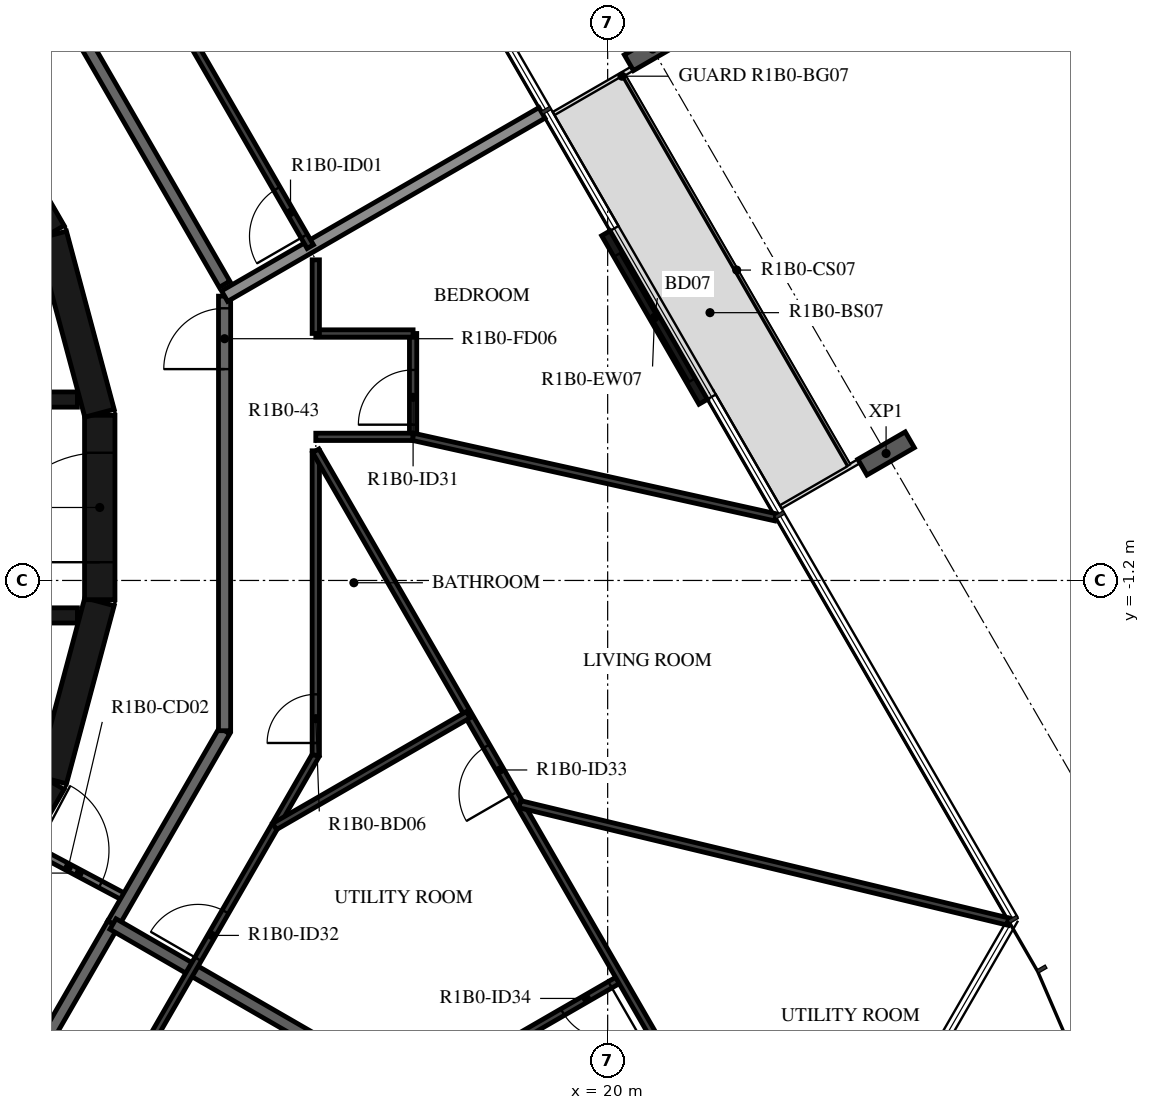
"""IFC4 building model, lengths in metres.
Left out: names, types, materials, properties, quantities, classifications, styles, units other than length and angle.
Written with IfcOpenShell. Run it as: python <this file> out.ifc"""

import sys

from ifc_helpers import new_model, si_unit, direction, frame, frame_2d, origin, origin_2d, place, context, subcontext, project, spatial, rectangle, i_section, extrude, element, fill, save


model = new_model("IFC4")
c1 = context("Model", 3, precision=1e-05, world=origin(), true_north=direction((0.0, 1.0)))
c2 = subcontext(c1, "Body", "Model", "MODEL_VIEW")
j1 = project(units=[si_unit("LENGTHUNIT", "METRE"), si_unit("PLANEANGLEUNIT", "RADIAN")], contexts=[c1])
p1 = place(None, origin())
s1 = spatial("IfcSite", under=j1, at=p1, CompositionType="ELEMENT")
p2 = place(p1, origin())
s2 = spatial("IfcBuilding", under=s1, at=p2, CompositionType="ELEMENT")
p3 = place(p2, frame((0.0, 0.0, 52.4)))
s3 = spatial("IfcBuildingStorey", under=s2, at=p3, CompositionType="ELEMENT", Elevation=52.4)
for number, where, z_axis, x_axis in (
    (1, (24.579, 0.888, -0.38), (0.0, 0.0, 1.0), (0.5, -0.866, 0.0)),
    (2, (20.739, 7.539, -0.38), (0.0, 0.0, 1.0), (0.5, -0.866, 0.0)),
):
    element("IfcColumn", number, at=place(p3, frame(where, z_axis=z_axis, x_axis=x_axis)), inside=s3, PredefinedType="COLUMN", context=c2, shape_type="SweptSolid", body=[
        extrude(i_section(OverallWidth=0.3, OverallDepth=0.9, WebThickness=0.019, FlangeThickness=0.035, FilletRadius=0.03, at=origin_2d()), origin(), (0.0, 0.0, 1.0), 3.5),
    ])
p4 = place(p3, frame((21.571, 1.738, 0.0), z_axis=(0.0, 0.0, 1.0), x_axis=(-0.500028443584, 0.866008981251, 0.0)))
e3 = element("IfcWall", 3, at=p4, inside=s3, PredefinedType="STANDARD", context=c2, shape_type="SweptSolid", body=[
    extrude(rectangle(XDim=3.2, YDim=0.16, at=frame_2d((1.6, 0.0))), origin(), (0.0, 0.0, 1.0), 3.12),
])
p5 = place(p4, frame((0.4, 0.0, 0.0)))
e4 = element("IfcOpeningElement", 4, at=p5, cuts=e3, PredefinedType="OPENING", context=c2, shape_type="SweptSolid", body=[
    extrude(rectangle(XDim=2.4, YDim=2.4, at=frame_2d((1.2, 1.2))), frame((0.0, 0.09, 0.0), z_axis=(0.0, -1.0, 0.0), x_axis=(1.0, 0.0, 0.0)), (0.0, 0.0, 1.0), 0.18),
])
for number, where, z_axis, x_axis in (
    (5, (9.329, -7.137, 0.0), (0.0, 0.0, 1.0), (0.5, 0.866, 0.0)),
    (6, (10.858, -4.479, 0.0), (0.0, 0.0, 1.0), (0.259, 0.966, 0.0)),
):
    element("IfcWall", number, at=place(p3, frame(where, z_axis=z_axis, x_axis=x_axis)), inside=s3, PredefinedType="SHEAR", context=c2, shape_type="SweptSolid", body=[
        extrude(rectangle(XDim=3.033, YDim=0.5, at=frame_2d((1.516, 0.0))), origin(), (0.0, 0.0, 1.0), 3.12),
    ])
p6 = place(p3, frame((11.647, -1.516, 0.0), z_axis=(0.0, 0.0, 1.0), x_axis=(0.0, 1.0, 0.0)))
e7 = element("IfcWall", 7, at=p6, inside=s3, PredefinedType="SHEAR", context=c2, shape_type="SweptSolid", body=[
    extrude(rectangle(XDim=3.033, YDim=0.5, at=frame_2d((1.516, 0.0))), origin(), (0.0, 0.0, 1.0), 3.12),
])
p7 = place(p6, frame((0.616, 0.0, 0.0)))
e8 = element("IfcOpeningElement", 8, at=p7, cuts=e7, PredefinedType="OPENING", context=c2, shape_type="SweptSolid", body=[
    extrude(rectangle(XDim=1.8, YDim=2.1, at=frame_2d((0.9, 1.05))), frame((0.0, 0.26, 0.0), z_axis=(0.0, -1.0, 0.0), x_axis=(1.0, 0.0, 0.0)), (0.0, 0.0, 1.0), 0.52),
])
for number, where, z_axis, x_axis in (
    (9, (11.643, 1.55, 0.0), (0.0, 0.0, 1.0), (-0.259, 0.966, 0.0)),
    (10, (10.845, 4.51, 0.0), (0.0, 0.0, 1.0), (-0.5, 0.866, 0.0)),
):
    element("IfcWall", number, at=place(p3, frame(where, z_axis=z_axis, x_axis=x_axis)), inside=s3, PredefinedType="SHEAR", context=c2, shape_type="SweptSolid", body=[
        extrude(rectangle(XDim=3.033, YDim=0.5, at=frame_2d((1.516, 0.0))), origin(), (0.0, 0.0, 1.0), 3.12),
    ])
p8 = place(p3, frame((3.35, 1.775, 0.0), z_axis=(0.0, 0.0, 1.0), x_axis=(1.0, 0.0, 0.0)))
e11 = element("IfcWall", 11, at=p8, inside=s3, PredefinedType="SHEAR", context=c2, shape_type="SweptSolid", body=[
    extrude(rectangle(XDim=7.93, YDim=0.25, at=frame_2d((3.965, 0.0))), origin(), (0.0, 0.0, 1.0), 3.12),
])
p9 = place(p8, frame((0.35, 0.0, 0.0)))
e12 = element("IfcOpeningElement", 12, at=p9, cuts=e11, PredefinedType="OPENING", context=c2, shape_type="SweptSolid", body=[
    extrude(rectangle(XDim=1.2, YDim=2.4, at=frame_2d((0.6, 1.2))), frame((0.0, 0.135, 0.0), z_axis=(0.0, -1.0, 0.0), x_axis=(1.0, 0.0, 0.0)), (0.0, 0.0, 1.0), 0.27),
])
p10 = place(p8, frame((2.5, 0.0, 0.0)))
e13 = element("IfcOpeningElement", 13, at=p10, cuts=e11, PredefinedType="OPENING", context=c2, shape_type="SweptSolid", body=[
    extrude(rectangle(XDim=1.2, YDim=2.4, at=frame_2d((0.6, 1.2))), frame((0.0, 0.135, 0.0), z_axis=(0.0, -1.0, 0.0), x_axis=(1.0, 0.0, 0.0)), (0.0, 0.0, 1.0), 0.27),
])
p11 = place(p8, frame((4.8, 0.0, 0.0)))
e14 = element("IfcOpeningElement", 14, at=p11, cuts=e11, PredefinedType="OPENING", context=c2, shape_type="SweptSolid", body=[
    extrude(rectangle(XDim=0.9, YDim=2.1, at=frame_2d((0.45, 1.05))), frame((0.0, 0.135, 0.0), z_axis=(0.0, -1.0, 0.0), x_axis=(1.0, 0.0, 0.0)), (0.0, 0.0, 1.0), 0.27),
])
p12 = place(p3, frame((3.35, -1.775, 0.0), z_axis=(0.0, 0.0, 1.0), x_axis=(1.0, 0.0, 0.0)))
e15 = element("IfcWall", 15, at=p12, inside=s3, PredefinedType="SHEAR", context=c2, shape_type="SweptSolid", body=[
    extrude(rectangle(XDim=7.93, YDim=0.25, at=frame_2d((3.965, 0.0))), origin(), (0.0, 0.0, 1.0), 3.12),
])
p13 = place(p12, frame((0.4, 0.0, 0.0)))
e16 = element("IfcOpeningElement", 16, at=p13, cuts=e15, PredefinedType="OPENING", context=c2, shape_type="SweptSolid", body=[
    extrude(rectangle(XDim=1.1, YDim=2.4, at=frame_2d((0.55, 1.2))), frame((0.0, 0.135, 0.0), z_axis=(0.0, -1.0, 0.0), x_axis=(1.0, 0.0, 0.0)), (0.0, 0.0, 1.0), 0.27),
])
p14 = place(p12, frame((2.55, 0.0, 0.0)))
e17 = element("IfcOpeningElement", 17, at=p14, cuts=e15, PredefinedType="OPENING", context=c2, shape_type="SweptSolid", body=[
    extrude(rectangle(XDim=1.1, YDim=2.4, at=frame_2d((0.55, 1.2))), frame((0.0, 0.135, 0.0), z_axis=(0.0, -1.0, 0.0), x_axis=(1.0, 0.0, 0.0)), (0.0, 0.0, 1.0), 0.27),
])
p15 = place(p12, frame((4.7, 0.0, 0.0)))
e18 = element("IfcOpeningElement", 18, at=p15, cuts=e15, PredefinedType="OPENING", context=c2, shape_type="SweptSolid", body=[
    extrude(rectangle(XDim=1.1, YDim=2.4, at=frame_2d((0.55, 1.2))), frame((0.0, 0.135, 0.0), z_axis=(0.0, -1.0, 0.0), x_axis=(1.0, 0.0, 0.0)), (0.0, 0.0, 1.0), 0.27),
])
p16 = place(p3, frame((10.511, -5.589, 0.0), z_axis=(0.0, 0.0, 1.0), x_axis=(0.88294043061, -0.469485032769, 0.0)))
e19 = element("IfcWall", 19, at=p16, inside=s3, PredefinedType="PARTITIONING", context=c2, shape_type="SweptSolid", body=[
    extrude(rectangle(XDim=1.804, YDim=0.12, at=frame_2d((0.902, 0.0))), origin(), (0.0, 0.0, 1.0), 3.12),
])
p17 = place(p16, frame((0.1, 0.0, 0.0)))
e20 = element("IfcOpeningElement", 20, at=p17, cuts=e19, PredefinedType="OPENING", context=c2, shape_type="SweptSolid", body=[
    extrude(rectangle(XDim=1.2, YDim=2.1, at=frame_2d((0.6, 1.05))), frame((0.0, 0.07, 0.0), z_axis=(0.0, -1.0, 0.0), x_axis=(1.0, 0.0, 0.0)), (0.0, 0.0, 1.0), 0.14),
])
p18 = place(p3, frame((13.7, 3.671, 0.0), z_axis=(0.0, 0.0, 1.0), x_axis=(-0.500001669485, 0.866024439905, 0.0)))
e21 = element("IfcWall", 21, at=p18, inside=s3, PredefinedType="STANDARD", context=c2, shape_type="SweptSolid", body=[
    extrude(rectangle(XDim=7.342, YDim=0.2, at=frame_2d((3.671, 0.0))), origin(), (0.0, 0.0, 1.0), 3.12),
])
p19 = place(p18, frame((6.142, 0.0, 0.0)))
e22 = element("IfcOpeningElement", 22, at=p19, cuts=e21, PredefinedType="OPENING", context=c2, shape_type="SweptSolid", body=[
    extrude(rectangle(XDim=1.0, YDim=2.1, at=frame_2d((0.5, 1.05))), frame((0.0, 0.11, 0.0), z_axis=(0.0, -1.0, 0.0), x_axis=(1.0, 0.0, 0.0)), (0.0, 0.0, 1.0), 0.22),
])
p20 = place(p3, frame((11.865, -6.85, 0.0), z_axis=(0.0, 0.0, 1.0), x_axis=(0.499987270552, 0.86603275301, 0.0)))
e23 = element("IfcWall", 23, at=p20, inside=s3, PredefinedType="STANDARD", context=c2, shape_type="SweptSolid", body=[
    extrude(rectangle(XDim=3.671, YDim=0.2, at=frame_2d((1.835, 0.0))), origin(), (0.0, 0.0, 1.0), 3.12),
])
p21 = place(p3, frame((13.7, -3.671, 0.0), z_axis=(0.0, 0.0, 1.0), x_axis=(0.0, 1.0, 0.0)))
e24 = element("IfcWall", 24, at=p21, inside=s3, PredefinedType="STANDARD", context=c2, shape_type="SweptSolid", body=[
    extrude(rectangle(XDim=7.146, YDim=0.2, at=frame_2d((3.573, 0.0))), origin(), (0.0, 0.0, 1.0), 3.12),
])
p22 = place(p21, frame((5.947, 0.0, 0.0)))
e25 = element("IfcOpeningElement", 25, at=p22, cuts=e24, PredefinedType="OPENING", context=c2, shape_type="SweptSolid", body=[
    extrude(rectangle(XDim=1.0, YDim=2.1, at=frame_2d((0.5, 1.05))), frame((0.0, 0.11, 0.0), z_axis=(0.0, -1.0, 0.0), x_axis=(1.0, 0.0, 0.0)), (0.0, 0.0, 1.0), 0.22),
])
p23 = place(p3, frame((10.029, -10.029, 0.0), z_axis=(0.0, 0.0, 1.0), x_axis=(0.50001606911, 0.866016126081, 0.0)))
e26 = element("IfcWall", 26, at=p23, inside=s3, PredefinedType="STANDARD", context=c2, shape_type="SweptSolid", body=[
    extrude(rectangle(XDim=3.671, YDim=0.2, at=frame_2d((1.835, 0.0))), origin(), (0.0, 0.0, 1.0), 3.12),
])
p24 = place(p3, frame((13.7, 3.476, 0.0), z_axis=(0.0, 0.0, 1.0), x_axis=(0.866013584312, 0.500020471368, 0.0)))
e27 = element("IfcWall", 27, at=p24, inside=s3, PredefinedType="STANDARD", context=c2, shape_type="SweptSolid", body=[
    extrude(rectangle(XDim=6.028, YDim=0.2, at=frame_2d((3.014, 0.0))), origin(), (0.0, 0.0, 1.0), 2.73),
])
p25 = place(p3, frame((16.817, -9.709, 0.0), z_axis=(0.0, 0.0, 1.0), x_axis=(-0.86604338933, 0.499968846828, 0.0)))
e28 = element("IfcWall", 28, at=p25, inside=s3, PredefinedType="STANDARD", context=c2, shape_type="SweptSolid", body=[
    extrude(rectangle(XDim=5.718, YDim=0.2, at=frame_2d((2.859, 0.0))), origin(), (0.0, 0.0, 1.0), 3.12),
])
p26 = place(p3, frame((15.11, 4.289, 0.0), z_axis=(0.0, 0.0, 1.0), x_axis=(-0.500033654285, 0.866005972602, 0.0)))
e29 = element("IfcWall", 29, at=p26, inside=s3, PredefinedType="PARTITIONING", context=c2, shape_type="SweptSolid", body=[
    extrude(rectangle(XDim=5.003, YDim=0.12, at=frame_2d((2.501, 0.0))), origin(), (0.0, 0.0, 1.0), 3.12),
])
p27 = place(p26, frame((0.2, 0.0, 0.0)))
e30 = element("IfcOpeningElement", 30, at=p27, cuts=e29, PredefinedType="OPENING", context=c2, shape_type="SweptSolid", body=[
    extrude(rectangle(XDim=0.9, YDim=2.1, at=frame_2d((0.45, 1.05))), frame((0.0, 0.07, 0.0), z_axis=(0.0, -1.0, 0.0), x_axis=(1.0, 0.0, 0.0)), (0.0, 0.0, 1.0), 0.14),
])
p28 = place(p3, frame((11.127, -11.127, 0.0), z_axis=(0.0, 0.0, 1.0), x_axis=(0.499987950692, 0.866032360344, 0.0)))
e31 = element("IfcWall", 31, at=p28, inside=s3, PredefinedType="PARTITIONING", context=c2, shape_type="SweptSolid", body=[
    extrude(rectangle(XDim=8.146, YDim=0.12, at=frame_2d((4.073, 0.0))), origin(), (0.0, 0.0, 1.0), 3.12),
])
p29 = place(p28, frame((1.303, 0.0, 0.0)))
e32 = element("IfcOpeningElement", 32, at=p29, cuts=e31, PredefinedType="OPENING", context=c2, shape_type="SweptSolid", body=[
    extrude(rectangle(XDim=0.9, YDim=2.1, at=frame_2d((0.45, 1.05))), frame((0.0, 0.07, 0.0), z_axis=(0.0, -1.0, 0.0), x_axis=(1.0, 0.0, 0.0)), (0.0, 0.0, 1.0), 0.14),
])
p30 = place(p28, frame((4.273, 0.0, 0.0)))
e33 = element("IfcOpeningElement", 33, at=p30, cuts=e31, PredefinedType="OPENING", context=c2, shape_type="SweptSolid", body=[
    extrude(rectangle(XDim=0.9, YDim=2.1, at=frame_2d((0.45, 1.05))), frame((0.0, 0.07, 0.0), z_axis=(0.0, -1.0, 0.0), x_axis=(1.0, 0.0, 0.0)), (0.0, 0.0, 1.0), 0.14),
])
p31 = place(p3, frame((16.8, 1.162, 0.0), z_axis=(0.0, 0.0, 1.0), x_axis=(0.0, 1.0, 0.0)))
e34 = element("IfcWall", 34, at=p31, inside=s3, PredefinedType="PARTITIONING", context=c2, shape_type="SweptSolid", body=[
    extrude(rectangle(XDim=1.7, YDim=0.12, at=frame_2d((0.85, 0.0))), origin(), (0.0, 0.0, 1.0), 3.12),
])
p32 = place(p31, frame((0.2, 0.0, 0.0)))
e35 = element("IfcOpeningElement", 35, at=p32, cuts=e34, PredefinedType="OPENING", context=c2, shape_type="SweptSolid", body=[
    extrude(rectangle(XDim=0.9, YDim=2.1, at=frame_2d((0.45, 1.05))), frame((0.0, 0.07, 0.0), z_axis=(0.0, -1.0, 0.0), x_axis=(1.0, 0.0, 0.0)), (0.0, 0.0, 1.0), 0.14),
])
p33 = place(p3, frame((16.8, 2.862, 0.0), z_axis=(0.0, 0.0, 1.0), x_axis=(-1.0, 0.0, 0.0)))
e36 = element("IfcWall", 36, at=p33, inside=s3, PredefinedType="PARTITIONING", context=c2, shape_type="SweptSolid", body=[
    extrude(rectangle(XDim=1.6, YDim=0.12, at=frame_2d((0.8, 0.0))), origin(), (0.0, 0.0, 1.0), 3.12),
])
p34 = place(p3, frame((15.2, 2.862, 0.0), z_axis=(0.0, 0.0, 1.0), x_axis=(0.0, 1.0, 0.0)))
e37 = element("IfcWall", 37, at=p34, inside=s3, PredefinedType="PARTITIONING", context=c2, shape_type="SweptSolid", body=[
    extrude(rectangle(XDim=1.211, YDim=0.12, at=frame_2d((0.605, 0.0))), origin(), (0.0, 0.0, 1.0), 3.12),
])
p35 = place(p3, frame((15.2, -4.073, 0.0), z_axis=(0.0, 0.0, 1.0), x_axis=(0.0, 1.0, 0.0)))
e38 = element("IfcWall", 38, at=p35, inside=s3, PredefinedType="PARTITIONING", context=c2, shape_type="SweptSolid", body=[
    extrude(rectangle(XDim=5.005, YDim=0.12, at=frame_2d((2.503, 0.0))), origin(), (0.0, 0.0, 1.0), 3.12),
])
p36 = place(p35, frame((0.2, 0.0, 0.0)))
e39 = element("IfcOpeningElement", 39, at=p36, cuts=e38, PredefinedType="OPENING", context=c2, shape_type="SweptSolid", body=[
    extrude(rectangle(XDim=0.8, YDim=2.1, at=frame_2d((0.4, 1.05))), frame((0.0, 0.07, 0.0), z_axis=(0.0, -1.0, 0.0), x_axis=(1.0, 0.0, 0.0)), (0.0, 0.0, 1.0), 0.14),
])
p37 = place(p3, frame((15.2, 1.162, 0.0), z_axis=(0.0, 0.0, 1.0), x_axis=(1.0, 0.0, 0.0)))
e40 = element("IfcWall", 40, at=p37, inside=s3, PredefinedType="PARTITIONING", context=c2, shape_type="SweptSolid", body=[
    extrude(rectangle(XDim=1.6, YDim=0.12, at=frame_2d((0.8, 0.0))), origin(), (0.0, 0.0, 1.0), 3.12),
])
p38 = place(p3, frame((16.8, 1.162, 0.0), z_axis=(0.0, 0.0, 1.0), x_axis=(0.976218101949, -0.216790722652, 0.0)))
e41 = element("IfcWall", 41, at=p38, inside=s3, PredefinedType="PARTITIONING", context=c2, shape_type="SweptSolid", body=[
    extrude(rectangle(XDim=6.105, YDim=0.12, at=frame_2d((3.052, 0.0))), origin(), (0.0, 0.0, 1.0), 3.12),
])
p39 = place(p3, frame((20.212, -7.749, 0.0), z_axis=(0.0, 0.0, 1.0), x_axis=(-0.86604663799, -0.499963219473, 0.0)))
e42 = element("IfcWall", 42, at=p39, inside=s3, PredefinedType="PARTITIONING", context=c2, shape_type="SweptSolid", body=[
    extrude(rectangle(XDim=3.921, YDim=0.12, at=frame_2d((1.96, 0.0))), origin(), (0.0, 0.0, 1.0), 3.12),
])
p40 = place(p39, frame((0.2, 0.0, 0.0)))
e43 = element("IfcOpeningElement", 43, at=p40, cuts=e42, PredefinedType="OPENING", context=c2, shape_type="SweptSolid", body=[
    extrude(rectangle(XDim=0.9, YDim=2.1, at=frame_2d((0.45, 1.05))), frame((0.0, 0.07, 0.0), z_axis=(0.0, -1.0, 0.0), x_axis=(1.0, 0.0, 0.0)), (0.0, 0.0, 1.0), 0.14),
])
p41 = place(p3, frame((21.701, -10.327, 0.0), z_axis=(0.0, 0.0, 1.0), x_axis=(-0.500008528526, 0.866020479782, 0.0)))
e44 = element("IfcWall", 44, at=p41, inside=s3, PredefinedType="PARTITIONING", context=c2, shape_type="SweptSolid", body=[
    extrude(rectangle(XDim=13.002, YDim=0.12, at=frame_2d((6.501, 0.0))), origin(), (0.0, 0.0, 1.0), 3.12),
])
p42 = place(p41, frame((6.49, 0.0, 0.0)))
e45 = element("IfcOpeningElement", 45, at=p42, cuts=e44, PredefinedType="OPENING", context=c2, shape_type="SweptSolid", body=[
    extrude(rectangle(XDim=0.9, YDim=2.1, at=frame_2d((0.45, 1.05))), frame((0.0, 0.07, 0.0), z_axis=(0.0, -1.0, 0.0), x_axis=(1.0, 0.0, 0.0)), (0.0, 0.0, 1.0), 0.14),
])
p43 = place(p41, frame((1.0, 0.0, 0.0)))
e46 = element("IfcOpeningElement", 46, at=p43, cuts=e44, PredefinedType="OPENING", context=c2, shape_type="SweptSolid", body=[
    extrude(rectangle(XDim=0.9, YDim=2.1, at=frame_2d((0.45, 1.05))), frame((0.0, 0.07, 0.0), z_axis=(0.0, -1.0, 0.0), x_axis=(1.0, 0.0, 0.0)), (0.0, 0.0, 1.0), 0.14),
])
p44 = place(p3, frame((17.706, -3.408, 0.0), z_axis=(0.0, 0.0, 1.0), x_axis=(-0.866027421574, -0.49999650507, 0.0)))
e47 = element("IfcWall", 47, at=p44, inside=s3, PredefinedType="PARTITIONING", context=c2, shape_type="SweptSolid", body=[
    extrude(rectangle(XDim=3.676, YDim=0.12, at=frame_2d((1.838, 0.0))), origin(), (0.0, 0.0, 1.0), 3.12),
])
p45 = place(p3, frame((26.6, -6.813, 0.0), z_axis=(0.0, 0.0, 1.0), x_axis=(-0.972306888212, 0.233707755831, 0.0)))
e48 = element("IfcWall", 48, at=p45, inside=s3, PredefinedType="PARTITIONING", context=c2, shape_type="SweptSolid", body=[
    extrude(rectangle(XDim=8.273, YDim=0.12, at=frame_2d((4.137, 0.0))), origin(), (0.0, 0.0, 1.0), 3.12),
])
p46 = place(p5, origin())
e49 = element("IfcDoor", 49, at=p46, inside=s3, OperationType="DOUBLE_DOOR_SLIDING", PredefinedType="DOOR", context=c2, shape_type="SweptSolid", body=[
    extrude(rectangle(XDim=2.4, YDim=2.4, at=frame_2d((1.2, 1.2))), frame((0.0, 0.025, 0.0), z_axis=(0.0, -1.0, 0.0), x_axis=(1.0, 0.0, 0.0)), (0.0, 0.0, 1.0), 0.05),
])
fill(e4, e49)
p47 = place(p7, origin())
e50 = element("IfcDoor", 50, at=p47, inside=s3, OperationType="DOUBLE_DOOR_SINGLE_SWING", PredefinedType="DOOR", context=c2, shape_type="SweptSolid", body=[
    extrude(rectangle(XDim=1.8, YDim=2.1, at=frame_2d((0.9, 1.05))), frame((0.0, 0.025, 0.0), z_axis=(0.0, -1.0, 0.0), x_axis=(1.0, 0.0, 0.0)), (0.0, 0.0, 1.0), 0.05),
])
fill(e8, e50)
p48 = place(p27, origin())
e51 = element("IfcDoor", 51, at=p48, inside=s3, OperationType="SINGLE_SWING_LEFT", PredefinedType="DOOR", context=c2, shape_type="SweptSolid", body=[
    extrude(rectangle(XDim=0.9, YDim=2.1, at=frame_2d((0.45, 1.05))), frame((0.0, 0.025, 0.0), z_axis=(0.0, -1.0, 0.0), x_axis=(1.0, 0.0, 0.0)), (0.0, 0.0, 1.0), 0.05),
])
fill(e30, e51)
p49 = place(p22, origin())
e52 = element("IfcDoor", 52, at=p49, inside=s3, OperationType="SINGLE_SWING_LEFT", PredefinedType="DOOR", context=c2, shape_type="SweptSolid", body=[
    extrude(rectangle(XDim=1.0, YDim=2.1, at=frame_2d((0.5, 1.05))), frame((0.0, 0.025, 0.0), z_axis=(0.0, -1.0, 0.0), x_axis=(1.0, 0.0, 0.0)), (0.0, 0.0, 1.0), 0.05),
])
fill(e25, e52)
p50 = place(p32, origin())
e53 = element("IfcDoor", 53, at=p50, inside=s3, OperationType="SINGLE_SWING_LEFT", PredefinedType="DOOR", context=c2, shape_type="SweptSolid", body=[
    extrude(rectangle(XDim=0.9, YDim=2.1, at=frame_2d((0.45, 1.05))), frame((0.0, 0.025, 0.0), z_axis=(0.0, -1.0, 0.0), x_axis=(1.0, 0.0, 0.0)), (0.0, 0.0, 1.0), 0.05),
])
fill(e35, e53)
p51 = place(p30, origin())
e54 = element("IfcDoor", 54, at=p51, inside=s3, OperationType="SINGLE_SWING_LEFT", PredefinedType="DOOR", context=c2, shape_type="SweptSolid", body=[
    extrude(rectangle(XDim=0.9, YDim=2.1, at=frame_2d((0.45, 1.05))), frame((0.0, 0.025, 0.0), z_axis=(0.0, -1.0, 0.0), x_axis=(1.0, 0.0, 0.0)), (0.0, 0.0, 1.0), 0.05),
])
fill(e33, e54)
p52 = place(p36, origin())
e55 = element("IfcDoor", 55, at=p52, inside=s3, OperationType="SINGLE_SWING_LEFT", PredefinedType="DOOR", context=c2, shape_type="SweptSolid", body=[
    extrude(rectangle(XDim=0.8, YDim=2.1, at=frame_2d((0.4, 1.05))), frame((0.0, 0.025, 0.0), z_axis=(0.0, -1.0, 0.0), x_axis=(1.0, 0.0, 0.0)), (0.0, 0.0, 1.0), 0.05),
])
fill(e39, e55)
p53 = place(p42, origin())
e56 = element("IfcDoor", 56, at=p53, inside=s3, OperationType="SINGLE_SWING_LEFT", PredefinedType="DOOR", context=c2, shape_type="SweptSolid", body=[
    extrude(rectangle(XDim=0.9, YDim=2.1, at=frame_2d((0.45, 1.05))), frame((0.0, 0.025, 0.0), z_axis=(0.0, -1.0, 0.0), x_axis=(1.0, 0.0, 0.0)), (0.0, 0.0, 1.0), 0.05),
])
fill(e45, e56)
p54 = place(p40, origin())
e57 = element("IfcDoor", 57, at=p54, inside=s3, OperationType="SINGLE_SWING_LEFT", PredefinedType="DOOR", context=c2, shape_type="SweptSolid", body=[
    extrude(rectangle(XDim=0.9, YDim=2.1, at=frame_2d((0.45, 1.05))), frame((0.0, 0.025, 0.0), z_axis=(0.0, -1.0, 0.0), x_axis=(1.0, 0.0, 0.0)), (0.0, 0.0, 1.0), 0.05),
])
fill(e43, e57)
p55 = place(p17, origin())
e58 = element("IfcDoor", 58, at=p55, inside=s3, OperationType="DOUBLE_DOOR_SINGLE_SWING", PredefinedType="DOOR", context=c2, shape_type="SweptSolid", body=[
    extrude(rectangle(XDim=1.2, YDim=2.1, at=frame_2d((0.6, 1.05))), frame((0.0, 0.025, 0.0), z_axis=(0.0, -1.0, 0.0), x_axis=(1.0, 0.0, 0.0)), (0.0, 0.0, 1.0), 0.05),
])
fill(e20, e58)
save(model, sys.argv[1])
